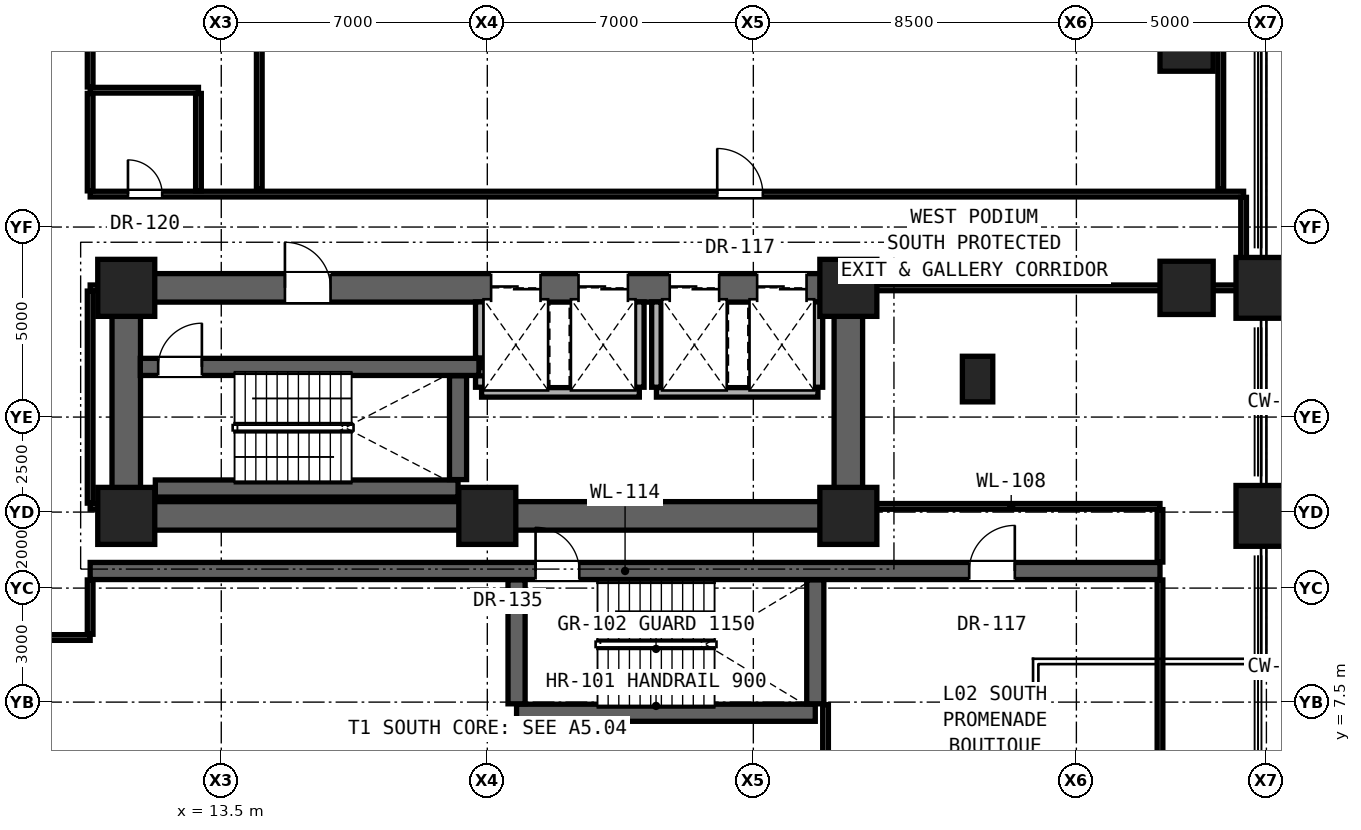
"""IFC4 building model, lengths in metres.
Left out: names, types, materials, properties, quantities, classifications, styles, units other than length and angle.
Written with IfcOpenShell. Run it as: python <this file> out.ifc"""

import sys

from ifc_helpers import new_model, si_unit, direction, frame, frame_2d, origin, origin_2d, place, context, subcontext, project, spatial, rectangle, hollow_rectangle, extrude, element, fill, save


model = new_model("IFC4")
c1 = context("Model", 3, precision=1e-05, world=origin(), true_north=direction((0.0, 1.0)))
c2 = subcontext(c1, "Body", "Model", "MODEL_VIEW")
j1 = project(units=[si_unit("LENGTHUNIT", "METRE"), si_unit("PLANEANGLEUNIT", "RADIAN")], contexts=[c1])
p1 = place(None, origin())
s1 = spatial("IfcSite", under=j1, at=p1, CompositionType="ELEMENT")
p2 = place(p1, origin())
s2 = spatial("IfcBuilding", under=s1, at=p2, CompositionType="ELEMENT")
p3 = place(p2, frame((0.0, 0.0, 9.5)))
s3 = spatial("IfcBuildingStorey", under=s2, at=p3, CompositionType="ELEMENT", Elevation=9.5)
for number, where, z_axis, x_axis in (
    (1, (11.0, 12.4, 0.0), (0.0, 0.0, 1.0), (1.0, 0.0, 0.0)),
    (2, (20.5, 12.4, 0.0), (0.0, 0.0, 1.0), (1.0, 0.0, 0.0)),
    (3, (30.0, 12.4, 0.0), (0.0, 0.0, 1.0), (1.0, 0.0, 0.0)),
    (4, (11.0, 18.4, 0.0), (0.0, 0.0, 1.0), (1.0, 0.0, 0.0)),
    (5, (30.0, 18.4, 0.0), (0.0, 0.0, 1.0), (1.0, 0.0, 0.0)),
):
    element("IfcColumn", number, at=place(p3, frame(where, z_axis=z_axis, x_axis=x_axis)), inside=s3, PredefinedType="COLUMN", context=c2, shape_type="SweptSolid", body=[
        extrude(rectangle(XDim=1.5, YDim=1.5, at=origin_2d()), origin(), (0.0, 0.0, 1.0), 4.3),
    ])
for number, where, z_axis, x_axis in (
    (6, (38.9, 18.4, 0.0), (0.0, 0.0, 1.0), (1.0, 0.0, 0.0)),
    (7, (38.9, 24.8, 0.0), (0.0, 0.0, 1.0), (1.0, 0.0, 0.0)),
):
    element("IfcColumn", number, at=place(p3, frame(where, z_axis=z_axis, x_axis=x_axis)), inside=s3, PredefinedType="COLUMN", context=c2, shape_type="SweptSolid", body=[
        extrude(hollow_rectangle(XDim=1.4, YDim=1.4, WallThickness=0.08, at=origin_2d()), origin(), (0.0, 0.0, 1.0), 4.3),
    ])
p4 = place(p3, frame((33.4, 16.0, 0.0), z_axis=(0.0, 0.0, 1.0), x_axis=(1.0, 0.0, 0.0)))
e8 = element("IfcColumn", 8, at=p4, inside=s3, PredefinedType="PILASTER", context=c2, shape_type="SweptSolid", body=[
    extrude(rectangle(XDim=0.8, YDim=1.2, at=origin_2d()), origin(), (0.0, 0.0, 1.0), 4.3),
])
p5 = place(p3, frame((11.0, 12.4, 0.0), z_axis=(0.0, 0.0, 1.0), x_axis=(1.0, 0.0, 0.0)))
e9 = element("IfcWall", 9, at=p5, inside=s3, PredefinedType="SHEAR", context=c2, shape_type="SweptSolid", body=[
    extrude(rectangle(XDim=19.0, YDim=0.75, at=frame_2d((9.5, 0.0))), origin(), (0.0, 0.0, 1.0), 3.98),
])
for number, where, z_axis, x_axis in (
    (10, (11.0, 12.4, 0.0), (0.0, 0.0, 1.0), (0.0, 1.0, 0.0)),
    (11, (30.0, 12.4, 0.0), (0.0, 0.0, 1.0), (0.0, 1.0, 0.0)),
):
    element("IfcWall", number, at=place(p3, frame(where, z_axis=z_axis, x_axis=x_axis)), inside=s3, PredefinedType="SHEAR", context=c2, shape_type="SweptSolid", body=[
        extrude(rectangle(XDim=6.0, YDim=0.75, at=frame_2d((3.0, 0.0))), origin(), (0.0, 0.0, 1.0), 3.98),
    ])
p6 = place(p3, frame((11.0, 18.4, 0.0), z_axis=(0.0, 0.0, 1.0), x_axis=(1.0, 0.0, 0.0)))
e12 = element("IfcWall", 12, at=p6, inside=s3, PredefinedType="SHEAR", context=c2, shape_type="SweptSolid", body=[
    extrude(rectangle(XDim=19.0, YDim=0.75, at=frame_2d((9.5, 0.0))), origin(), (0.0, 0.0, 1.0), 3.98),
])
p7 = place(p6, frame((4.175, 0.0, 0.0)))
e13 = element("IfcOpeningElement", 13, at=p7, cuts=e12, PredefinedType="OPENING", context=c2, shape_type="SweptSolid", body=[
    extrude(rectangle(XDim=1.2, YDim=2.25, at=frame_2d((0.6, 1.125))), frame((0.0, 0.385, 0.0), z_axis=(0.0, -1.0, 0.0), x_axis=(1.0, 0.0, 0.0)), (0.0, 0.0, 1.0), 0.77),
])
p8 = place(p6, frame((9.6, 0.0, 0.0)))
e14 = element("IfcOpeningElement", 14, at=p8, cuts=e12, PredefinedType="OPENING", context=c2, shape_type="SweptSolid", body=[
    extrude(rectangle(XDim=1.3, YDim=2.3, at=frame_2d((0.65, 1.15))), frame((0.0, 0.385, 0.0), z_axis=(0.0, -1.0, 0.0), x_axis=(1.0, 0.0, 0.0)), (0.0, 0.0, 1.0), 0.77),
])
p9 = place(p6, frame((11.9, 0.0, 0.0)))
e15 = element("IfcOpeningElement", 15, at=p9, cuts=e12, PredefinedType="OPENING", context=c2, shape_type="SweptSolid", body=[
    extrude(rectangle(XDim=1.3, YDim=2.3, at=frame_2d((0.65, 1.15))), frame((0.0, 0.385, 0.0), z_axis=(0.0, -1.0, 0.0), x_axis=(1.0, 0.0, 0.0)), (0.0, 0.0, 1.0), 0.77),
])
p10 = place(p6, frame((14.3, 0.0, 0.0)))
e16 = element("IfcOpeningElement", 16, at=p10, cuts=e12, PredefinedType="OPENING", context=c2, shape_type="SweptSolid", body=[
    extrude(rectangle(XDim=1.3, YDim=2.3, at=frame_2d((0.65, 1.15))), frame((0.0, 0.385, 0.0), z_axis=(0.0, -1.0, 0.0), x_axis=(1.0, 0.0, 0.0)), (0.0, 0.0, 1.0), 0.77),
])
p11 = place(p6, frame((16.6, 0.0, 0.0)))
e17 = element("IfcOpeningElement", 17, at=p11, cuts=e12, PredefinedType="OPENING", context=c2, shape_type="SweptSolid", body=[
    extrude(rectangle(XDim=1.3, YDim=2.3, at=frame_2d((0.65, 1.15))), frame((0.0, 0.385, 0.0), z_axis=(0.0, -1.0, 0.0), x_axis=(1.0, 0.0, 0.0)), (0.0, 0.0, 1.0), 0.77),
])
for number, where, z_axis, x_axis in (
    (18, (41.0, 12.4, 0.0), (0.0, 0.0, 1.0), (1.0, 0.0, 0.0)),
    (19, (41.0, 18.4, 0.0), (0.0, 0.0, 1.0), (1.0, 0.0, 0.0)),
):
    element("IfcColumn", number, at=place(p3, frame(where, z_axis=z_axis, x_axis=x_axis)), inside=s3, PredefinedType="COLUMN", context=c2, shape_type="SweptSolid", body=[
        extrude(rectangle(XDim=1.6, YDim=1.6, at=origin_2d()), origin(), (0.0, 0.0, 1.0), 4.3),
    ])
p12 = place(p3, frame((21.27, 7.22, 0.0), z_axis=(0.0, 0.0, 1.0), x_axis=(1.0, 0.0, 0.0)))
e20 = element("IfcWall", 20, at=p12, inside=s3, PredefinedType="SHEAR", context=c2, shape_type="SweptSolid", body=[
    extrude(rectangle(XDim=7.86, YDim=0.45, at=frame_2d((3.93, 0.0))), origin(), (0.0, 0.0, 1.0), 3.98),
])
p13 = place(p3, frame((7.8, 9.2, 0.0), z_axis=(0.0, 0.0, 1.0), x_axis=(1.0, 0.0, 0.0)))
e21 = element("IfcWall", 21, at=p13, inside=s3, PredefinedType="PARTITIONING", context=c2, shape_type="SweptSolid", body=[
    extrude(rectangle(XDim=2.25, YDim=0.15, at=frame_2d((1.125, 0.0))), origin(), (0.0, 0.0, 1.0), 3.98),
])
p14 = place(p3, frame((10.05, 10.95, 0.0), z_axis=(0.0, 0.0, 1.0), x_axis=(1.0, 0.0, 0.0)))
e22 = element("IfcWall", 22, at=p14, inside=s3, PredefinedType="SHEAR", context=c2, shape_type="SweptSolid", body=[
    extrude(rectangle(XDim=28.15, YDim=0.45, at=frame_2d((14.075, 0.0))), origin(), (0.0, 0.0, 1.0), 3.98),
])
p15 = place(p14, frame((11.72, 0.0, 0.0)))
e23 = element("IfcOpeningElement", 23, at=p15, cuts=e22, PredefinedType="OPENING", context=c2, shape_type="SweptSolid", body=[
    extrude(rectangle(XDim=1.15, YDim=2.2, at=frame_2d((0.575, 1.1))), frame((0.0, 0.235, 0.0), z_axis=(0.0, -1.0, 0.0), x_axis=(1.0, 0.0, 0.0)), (0.0, 0.0, 1.0), 0.47),
])
p16 = place(p14, frame((23.13, 0.0, 0.0)))
e24 = element("IfcOpeningElement", 24, at=p16, cuts=e22, PredefinedType="OPENING", context=c2, shape_type="SweptSolid", body=[
    extrude(rectangle(XDim=1.2, YDim=2.25, at=frame_2d((0.6, 1.125))), frame((0.0, 0.235, 0.0), z_axis=(0.0, -1.0, 0.0), x_axis=(1.0, 0.0, 0.0)), (0.0, 0.0, 1.0), 0.47),
])
p17 = place(p3, frame((10.05, 12.65, 0.0), z_axis=(0.0, 0.0, 1.0), x_axis=(1.0, 0.0, 0.0)))
e25 = element("IfcWall", 25, at=p17, inside=s3, PredefinedType="PARTITIONING", context=c2, shape_type="SweptSolid", body=[
    extrude(rectangle(XDim=0.58, YDim=0.15, at=frame_2d((0.29, 0.0))), origin(), (0.0, 0.0, 1.0), 3.98),
])
p18 = place(p3, frame((30.37, 12.65, 0.0), z_axis=(0.0, 0.0, 1.0), x_axis=(1.0, 0.0, 0.0)))
e26 = element("IfcWall", 26, at=p18, inside=s3, PredefinedType="PARTITIONING", context=c2, shape_type="SweptSolid", body=[
    extrude(rectangle(XDim=7.83, YDim=0.15, at=frame_2d((3.915, 0.0))), origin(), (0.0, 0.0, 1.0), 3.024),
])
p19 = place(p3, frame((11.765, 13.12, 0.0), z_axis=(0.0, 0.0, 1.0), x_axis=(1.0, 0.0, 0.0)))
e27 = element("IfcWall", 27, at=p19, inside=s3, PredefinedType="SHEAR", context=c2, shape_type="SweptSolid", body=[
    extrude(rectangle(XDim=7.965, YDim=0.45, at=frame_2d((3.982, 0.0))), origin(), (0.0, 0.0, 1.0), 3.98),
])
p20 = place(p3, frame((20.35, 15.65, 0.0), z_axis=(0.0, 0.0, 1.0), x_axis=(1.0, 0.0, 0.0)))
e28 = element("IfcWall", 28, at=p20, inside=s3, PredefinedType="SOLIDWALL", context=c2, shape_type="SweptSolid", body=[
    extrude(rectangle(XDim=4.15, YDim=0.25, at=frame_2d((2.075, 0.0))), origin(), (0.0, 0.0, 1.0), 3.98),
])
p21 = place(p3, frame((24.95, 15.65, 0.0), z_axis=(0.0, 0.0, 1.0), x_axis=(1.0, 0.0, 0.0)))
e29 = element("IfcWall", 29, at=p21, inside=s3, PredefinedType="SOLIDWALL", context=c2, shape_type="SweptSolid", body=[
    extrude(rectangle(XDim=4.25, YDim=0.25, at=frame_2d((2.125, 0.0))), origin(), (0.0, 0.0, 1.0), 3.98),
])
p22 = place(p3, frame((11.37, 16.32, 0.0), z_axis=(0.0, 0.0, 1.0), x_axis=(1.0, 0.0, 0.0)))
e30 = element("IfcWall", 30, at=p22, inside=s3, PredefinedType="SHEAR", context=c2, shape_type="SweptSolid", body=[
    extrude(rectangle(XDim=8.91, YDim=0.45, at=frame_2d((4.455, 0.0))), origin(), (0.0, 0.0, 1.0), 3.98),
])
p23 = place(p22, frame((0.47, 0.0, 0.0)))
e31 = element("IfcOpeningElement", 31, at=p23, cuts=e30, PredefinedType="OPENING", context=c2, shape_type="SweptSolid", body=[
    extrude(rectangle(XDim=1.15, YDim=2.2, at=frame_2d((0.575, 1.1))), frame((0.0, 0.235, 0.0), z_axis=(0.0, -1.0, 0.0), x_axis=(1.0, 0.0, 0.0)), (0.0, 0.0, 1.0), 0.47),
])
p24 = place(p3, frame((10.05, 18.4, 0.0), z_axis=(0.0, 0.0, 1.0), x_axis=(1.0, 0.0, 0.0)))
e32 = element("IfcWall", 32, at=p24, inside=s3, PredefinedType="PARTITIONING", context=c2, shape_type="SweptSolid", body=[
    extrude(rectangle(XDim=0.58, YDim=0.15, at=frame_2d((0.29, 0.0))), origin(), (0.0, 0.0, 1.0), 2.872),
])
p25 = place(p3, frame((30.37, 18.4, 0.0), z_axis=(0.0, 0.0, 1.0), x_axis=(1.0, 0.0, 0.0)))
e33 = element("IfcWall", 33, at=p25, inside=s3, PredefinedType="PARTITIONING", context=c2, shape_type="SweptSolid", body=[
    extrude(rectangle(XDim=10.03, YDim=0.15, at=frame_2d((5.015, 0.0))), origin(), (0.0, 0.0, 1.0), 2.872),
])
p26 = place(p3, frame((10.05, 20.867, 0.0), z_axis=(0.0, 0.0, 1.0), x_axis=(1.0, 0.0, 0.0)))
e34 = element("IfcWall", 34, at=p26, inside=s3, PredefinedType="PARTITIONING", context=c2, shape_type="SweptSolid", body=[
    extrude(rectangle(XDim=30.35, YDim=0.15, at=frame_2d((15.175, 0.0))), origin(), (0.0, 0.0, 1.0), 2.932),
])
p27 = place(p26, frame((0.995, 0.0, 0.0)))
e35 = element("IfcOpeningElement", 35, at=p27, cuts=e34, PredefinedType="OPENING", context=c2, shape_type="SweptSolid", body=[
    extrude(rectangle(XDim=0.9, YDim=2.1, at=frame_2d((0.45, 1.05))), frame((0.0, 0.085, 0.0), z_axis=(0.0, -1.0, 0.0), x_axis=(1.0, 0.0, 0.0)), (0.0, 0.0, 1.0), 0.17),
])
p28 = place(p26, frame((16.5, 0.0, 0.0)))
e36 = element("IfcOpeningElement", 36, at=p28, cuts=e34, PredefinedType="OPENING", context=c2, shape_type="SweptSolid", body=[
    extrude(rectangle(XDim=1.2, YDim=2.25, at=frame_2d((0.6, 1.125))), frame((0.0, 0.085, 0.0), z_axis=(0.0, -1.0, 0.0), x_axis=(1.0, 0.0, 0.0)), (0.0, 0.0, 1.0), 0.17),
])
p29 = place(p3, frame((10.05, 23.6, 0.0), z_axis=(0.0, 0.0, 1.0), x_axis=(1.0, 0.0, 0.0)))
e37 = element("IfcWall", 37, at=p29, inside=s3, PredefinedType="PARTITIONING", context=c2, shape_type="SweptSolid", body=[
    extrude(rectangle(XDim=2.85, YDim=0.15, at=frame_2d((1.425, 0.0))), origin(), (0.0, 0.0, 1.0), 2.932),
])
p30 = place(p3, frame((10.05, 9.285, 0.0), z_axis=(0.0, 0.0, 1.0), x_axis=(0.0, 1.0, 0.0)))
e38 = element("IfcWall", 38, at=p30, inside=s3, PredefinedType="PARTITIONING", context=c2, shape_type="SweptSolid", body=[
    extrude(rectangle(XDim=1.43, YDim=0.15, at=frame_2d((0.715, 0.0))), origin(), (0.0, 0.0, 1.0), 3.98),
])
p31 = place(p3, frame((10.05, 12.735, 0.0), z_axis=(0.0, 0.0, 1.0), x_axis=(0.0, 1.0, 0.0)))
e39 = element("IfcWall", 39, at=p31, inside=s3, PredefinedType="PARTITIONING", context=c2, shape_type="SweptSolid", body=[
    extrude(rectangle(XDim=5.58, YDim=0.15, at=frame_2d((2.79, 0.0))), origin(), (0.0, 0.0, 1.0), 2.872),
])
p32 = place(p3, frame((10.05, 20.952, 0.0), z_axis=(0.0, 0.0, 1.0), x_axis=(0.0, 1.0, 0.0)))
e40 = element("IfcWall", 40, at=p32, inside=s3, PredefinedType="PARTITIONING", context=c2, shape_type="SweptSolid", body=[
    extrude(rectangle(XDim=2.563, YDim=0.15, at=frame_2d((1.282, 0.0))), origin(), (0.0, 0.0, 1.0), 3.98),
])
p33 = place(p3, frame((10.05, 23.685, 0.0), z_axis=(0.0, 0.0, 1.0), x_axis=(0.0, 1.0, 0.0)))
e41 = element("IfcWall", 41, at=p33, inside=s3, PredefinedType="PARTITIONING", context=c2, shape_type="SweptSolid", body=[
    extrude(rectangle(XDim=7.83, YDim=0.15, at=frame_2d((3.915, 0.0))), origin(), (0.0, 0.0, 1.0), 3.199),
])
p34 = place(p3, frame((12.9, 20.952, 0.0), z_axis=(0.0, 0.0, 1.0), x_axis=(0.0, 1.0, 0.0)))
e42 = element("IfcWall", 42, at=p34, inside=s3, PredefinedType="PARTITIONING", context=c2, shape_type="SweptSolid", body=[
    extrude(rectangle(XDim=2.563, YDim=0.15, at=frame_2d((1.282, 0.0))), origin(), (0.0, 0.0, 1.0), 3.98),
])
p35 = place(p3, frame((14.5, 21.0, 0.0), z_axis=(0.0, 0.0, 1.0), x_axis=(0.0, 1.0, 0.0)))
e43 = element("IfcWall", 43, at=p35, inside=s3, PredefinedType="PARTITIONING", context=c2, shape_type="SweptSolid", body=[
    extrude(rectangle(XDim=10.315, YDim=0.15, at=frame_2d((5.157, 0.0))), origin(), (0.0, 0.0, 1.0), 2.932),
])
p36 = place(p3, frame((19.73, 13.355, 0.0), z_axis=(0.0, 0.0, 1.0), x_axis=(0.0, 1.0, 0.0)))
e44 = element("IfcWall", 44, at=p36, inside=s3, PredefinedType="SHEAR", context=c2, shape_type="SweptSolid", body=[
    extrude(rectangle(XDim=2.73, YDim=0.45, at=frame_2d((1.365, 0.0))), origin(), (0.0, 0.0, 1.0), 3.98),
])
p37 = place(p3, frame((20.315, 15.785, 0.0), z_axis=(0.0, 0.0, 1.0), x_axis=(0.0, 1.0, 0.0)))
e45 = element("IfcWall", 45, at=p37, inside=s3, PredefinedType="SOLIDWALL", context=c2, shape_type="SweptSolid", body=[
    extrude(rectangle(XDim=0.3, YDim=0.25, at=frame_2d((0.15, 0.0))), origin(), (0.0, 0.0, 1.0), 3.98),
])
p38 = place(p3, frame((20.315, 16.555, 0.0), z_axis=(0.0, 0.0, 1.0), x_axis=(0.0, 1.0, 0.0)))
e46 = element("IfcWall", 46, at=p38, inside=s3, PredefinedType="SOLIDWALL", context=c2, shape_type="SweptSolid", body=[
    extrude(rectangle(XDim=1.475, YDim=0.25, at=frame_2d((0.738, 0.0))), origin(), (0.0, 0.0, 1.0), 3.98),
])
p39 = place(p3, frame((21.27, 7.455, 0.0), z_axis=(0.0, 0.0, 1.0), x_axis=(0.0, 1.0, 0.0)))
e47 = element("IfcWall", 47, at=p39, inside=s3, PredefinedType="SHEAR", context=c2, shape_type="SweptSolid", body=[
    extrude(rectangle(XDim=3.26, YDim=0.45, at=frame_2d((1.63, 0.0))), origin(), (0.0, 0.0, 1.0), 3.98),
])
for number, where, z_axis, x_axis in (
    (48, (24.5, 15.785, 0.0), (0.0, 0.0, 1.0), (0.0, 1.0, 0.0)),
    (49, (24.95, 15.785, 0.0), (0.0, 0.0, 1.0), (0.0, 1.0, 0.0)),
):
    element("IfcWall", number, at=place(p3, frame(where, z_axis=z_axis, x_axis=x_axis)), inside=s3, PredefinedType="SOLIDWALL", context=c2, shape_type="SweptSolid", body=[
        extrude(rectangle(XDim=2.245, YDim=0.25, at=frame_2d((1.123, 0.0))), origin(), (0.0, 0.0, 1.0), 3.98),
    ])
p40 = place(p3, frame((29.13, 7.455, 0.0), z_axis=(0.0, 0.0, 1.0), x_axis=(0.0, 1.0, 0.0)))
e50 = element("IfcWall", 50, at=p40, inside=s3, PredefinedType="SHEAR", context=c2, shape_type="SweptSolid", body=[
    extrude(rectangle(XDim=3.26, YDim=0.45, at=frame_2d((1.63, 0.0))), origin(), (0.0, 0.0, 1.0), 3.98),
])
p41 = place(p3, frame((29.2, 15.785, 0.0), z_axis=(0.0, 0.0, 1.0), x_axis=(0.0, 1.0, 0.0)))
e51 = element("IfcWall", 51, at=p41, inside=s3, PredefinedType="SOLIDWALL", context=c2, shape_type="SweptSolid", body=[
    extrude(rectangle(XDim=2.245, YDim=0.25, at=frame_2d((1.123, 0.0))), origin(), (0.0, 0.0, 1.0), 3.98),
])
p42 = place(p3, frame((29.4, 3.785, 0.0), z_axis=(0.0, 0.0, 1.0), x_axis=(0.0, 1.0, 0.0)))
e52 = element("IfcWall", 52, at=p42, inside=s3, PredefinedType="PARTITIONING", context=c2, shape_type="SweptSolid", body=[
    extrude(rectangle(XDim=3.65, YDim=0.15, at=frame_2d((1.825, 0.0))), origin(), (0.0, 0.0, 1.0), 3.199),
])
p43 = place(p3, frame((38.2, 3.785, 0.0), z_axis=(0.0, 0.0, 1.0), x_axis=(0.0, 1.0, 0.0)))
e53 = element("IfcWall", 53, at=p43, inside=s3, PredefinedType="PARTITIONING", context=c2, shape_type="SweptSolid", body=[
    extrude(rectangle(XDim=6.93, YDim=0.15, at=frame_2d((3.465, 0.0))), origin(), (0.0, 0.0, 1.0), 3.199),
])
p44 = place(p3, frame((38.2, 11.185, 0.0), z_axis=(0.0, 0.0, 1.0), x_axis=(0.0, 1.0, 0.0)))
e54 = element("IfcWall", 54, at=p44, inside=s3, PredefinedType="PARTITIONING", context=c2, shape_type="SweptSolid", body=[
    extrude(rectangle(XDim=1.38, YDim=0.15, at=frame_2d((0.69, 0.0))), origin(), (0.0, 0.0, 1.0), 3.024),
])
p45 = place(p3, frame((39.8, 21.0, 0.0), z_axis=(0.0, 0.0, 1.0), x_axis=(0.0, 1.0, 0.0)))
e55 = element("IfcWall", 55, at=p45, inside=s3, PredefinedType="PARTITIONING", context=c2, shape_type="SweptSolid", body=[
    extrude(rectangle(XDim=10.315, YDim=0.15, at=frame_2d((5.157, 0.0))), origin(), (0.0, 0.0, 1.0), 3.98),
])
p46 = place(p3, frame((40.4, 18.485, 0.0), z_axis=(0.0, 0.0, 1.0), x_axis=(0.0, 1.0, 0.0)))
e56 = element("IfcWall", 56, at=p46, inside=s3, PredefinedType="PARTITIONING", context=c2, shape_type="SweptSolid", body=[
    extrude(rectangle(XDim=2.297, YDim=0.15, at=frame_2d((1.148, 0.0))), origin(), (0.0, 0.0, 1.0), 3.024),
])
p47 = place(p7, origin())
e57 = element("IfcDoor", 57, at=p47, inside=s3, OperationType="SINGLE_SWING_LEFT", PredefinedType="DOOR", context=c2, shape_type="SweptSolid", body=[
    extrude(rectangle(XDim=1.2, YDim=2.25, at=frame_2d((0.6, 1.125))), frame((0.0, 0.025, 0.0), z_axis=(0.0, -1.0, 0.0), x_axis=(1.0, 0.0, 0.0)), (0.0, 0.0, 1.0), 0.05),
])
fill(e13, e57)
p48 = place(p23, origin())
e58 = element("IfcDoor", 58, at=p48, inside=s3, OperationType="SINGLE_SWING_RIGHT", PredefinedType="DOOR", context=c2, shape_type="SweptSolid", body=[
    extrude(rectangle(XDim=1.15, YDim=2.2, at=frame_2d((0.575, 1.1))), frame((0.0, 0.025, 0.0), z_axis=(0.0, -1.0, 0.0), x_axis=(1.0, 0.0, 0.0)), (0.0, 0.0, 1.0), 0.05),
])
fill(e31, e58)
p49 = place(p27, origin())
e59 = element("IfcDoor", 59, at=p49, inside=s3, OperationType="SINGLE_SWING_LEFT", PredefinedType="DOOR", context=c2, shape_type="SweptSolid", body=[
    extrude(rectangle(XDim=0.9, YDim=2.1, at=frame_2d((0.45, 1.05))), frame((0.0, 0.025, 0.0), z_axis=(0.0, -1.0, 0.0), x_axis=(1.0, 0.0, 0.0)), (0.0, 0.0, 1.0), 0.05),
])
fill(e35, e59)
p50 = place(p15, origin())
e60 = element("IfcDoor", 60, at=p50, inside=s3, OperationType="SINGLE_SWING_LEFT", PredefinedType="DOOR", context=c2, shape_type="SweptSolid", body=[
    extrude(rectangle(XDim=1.15, YDim=2.2, at=frame_2d((0.575, 1.1))), frame((0.0, 0.025, 0.0), z_axis=(0.0, -1.0, 0.0), x_axis=(1.0, 0.0, 0.0)), (0.0, 0.0, 1.0), 0.05),
])
fill(e23, e60)
p51 = place(p28, origin())
e61 = element("IfcDoor", 61, at=p51, inside=s3, OperationType="SINGLE_SWING_LEFT", PredefinedType="DOOR", context=c2, shape_type="SweptSolid", body=[
    extrude(rectangle(XDim=1.2, YDim=2.25, at=frame_2d((0.6, 1.125))), frame((0.0, 0.025, 0.0), z_axis=(0.0, -1.0, 0.0), x_axis=(1.0, 0.0, 0.0)), (0.0, 0.0, 1.0), 0.05),
])
fill(e36, e61)
p52 = place(p16, origin())
e62 = element("IfcDoor", 62, at=p52, inside=s3, OperationType="SINGLE_SWING_RIGHT", PredefinedType="DOOR", context=c2, shape_type="SweptSolid", body=[
    extrude(rectangle(XDim=1.2, YDim=2.25, at=frame_2d((0.6, 1.125))), frame((0.0, 0.025, 0.0), z_axis=(0.0, -1.0, 0.0), x_axis=(1.0, 0.0, 0.0)), (0.0, 0.0, 1.0), 0.05),
])
fill(e24, e62)
p53 = place(p8, origin())
e63 = element("IfcDoor", 63, at=p53, inside=s3, OperationType="DOUBLE_DOOR_SLIDING", PredefinedType="DOOR", context=c2, shape_type="SweptSolid", body=[
    extrude(rectangle(XDim=1.3, YDim=2.3, at=frame_2d((0.65, 1.15))), frame((0.0, 0.025, 0.0), z_axis=(0.0, -1.0, 0.0), x_axis=(1.0, 0.0, 0.0)), (0.0, 0.0, 1.0), 0.05),
])
fill(e14, e63)
p54 = place(p9, origin())
e64 = element("IfcDoor", 64, at=p54, inside=s3, OperationType="DOUBLE_DOOR_SLIDING", PredefinedType="DOOR", context=c2, shape_type="SweptSolid", body=[
    extrude(rectangle(XDim=1.3, YDim=2.3, at=frame_2d((0.65, 1.15))), frame((0.0, 0.025, 0.0), z_axis=(0.0, -1.0, 0.0), x_axis=(1.0, 0.0, 0.0)), (0.0, 0.0, 1.0), 0.05),
])
fill(e15, e64)
p55 = place(p10, origin())
e65 = element("IfcDoor", 65, at=p55, inside=s3, OperationType="DOUBLE_DOOR_SLIDING", PredefinedType="DOOR", context=c2, shape_type="SweptSolid", body=[
    extrude(rectangle(XDim=1.3, YDim=2.3, at=frame_2d((0.65, 1.15))), frame((0.0, 0.025, 0.0), z_axis=(0.0, -1.0, 0.0), x_axis=(1.0, 0.0, 0.0)), (0.0, 0.0, 1.0), 0.05),
])
fill(e16, e65)
p56 = place(p11, origin())
e66 = element("IfcDoor", 66, at=p56, inside=s3, OperationType="DOUBLE_DOOR_SLIDING", PredefinedType="DOOR", context=c2, shape_type="SweptSolid", body=[
    extrude(rectangle(XDim=1.3, YDim=2.3, at=frame_2d((0.65, 1.15))), frame((0.0, 0.025, 0.0), z_axis=(0.0, -1.0, 0.0), x_axis=(1.0, 0.0, 0.0)), (0.0, 0.0, 1.0), 0.05),
])
fill(e17, e66)
save(model, sys.argv[1])
